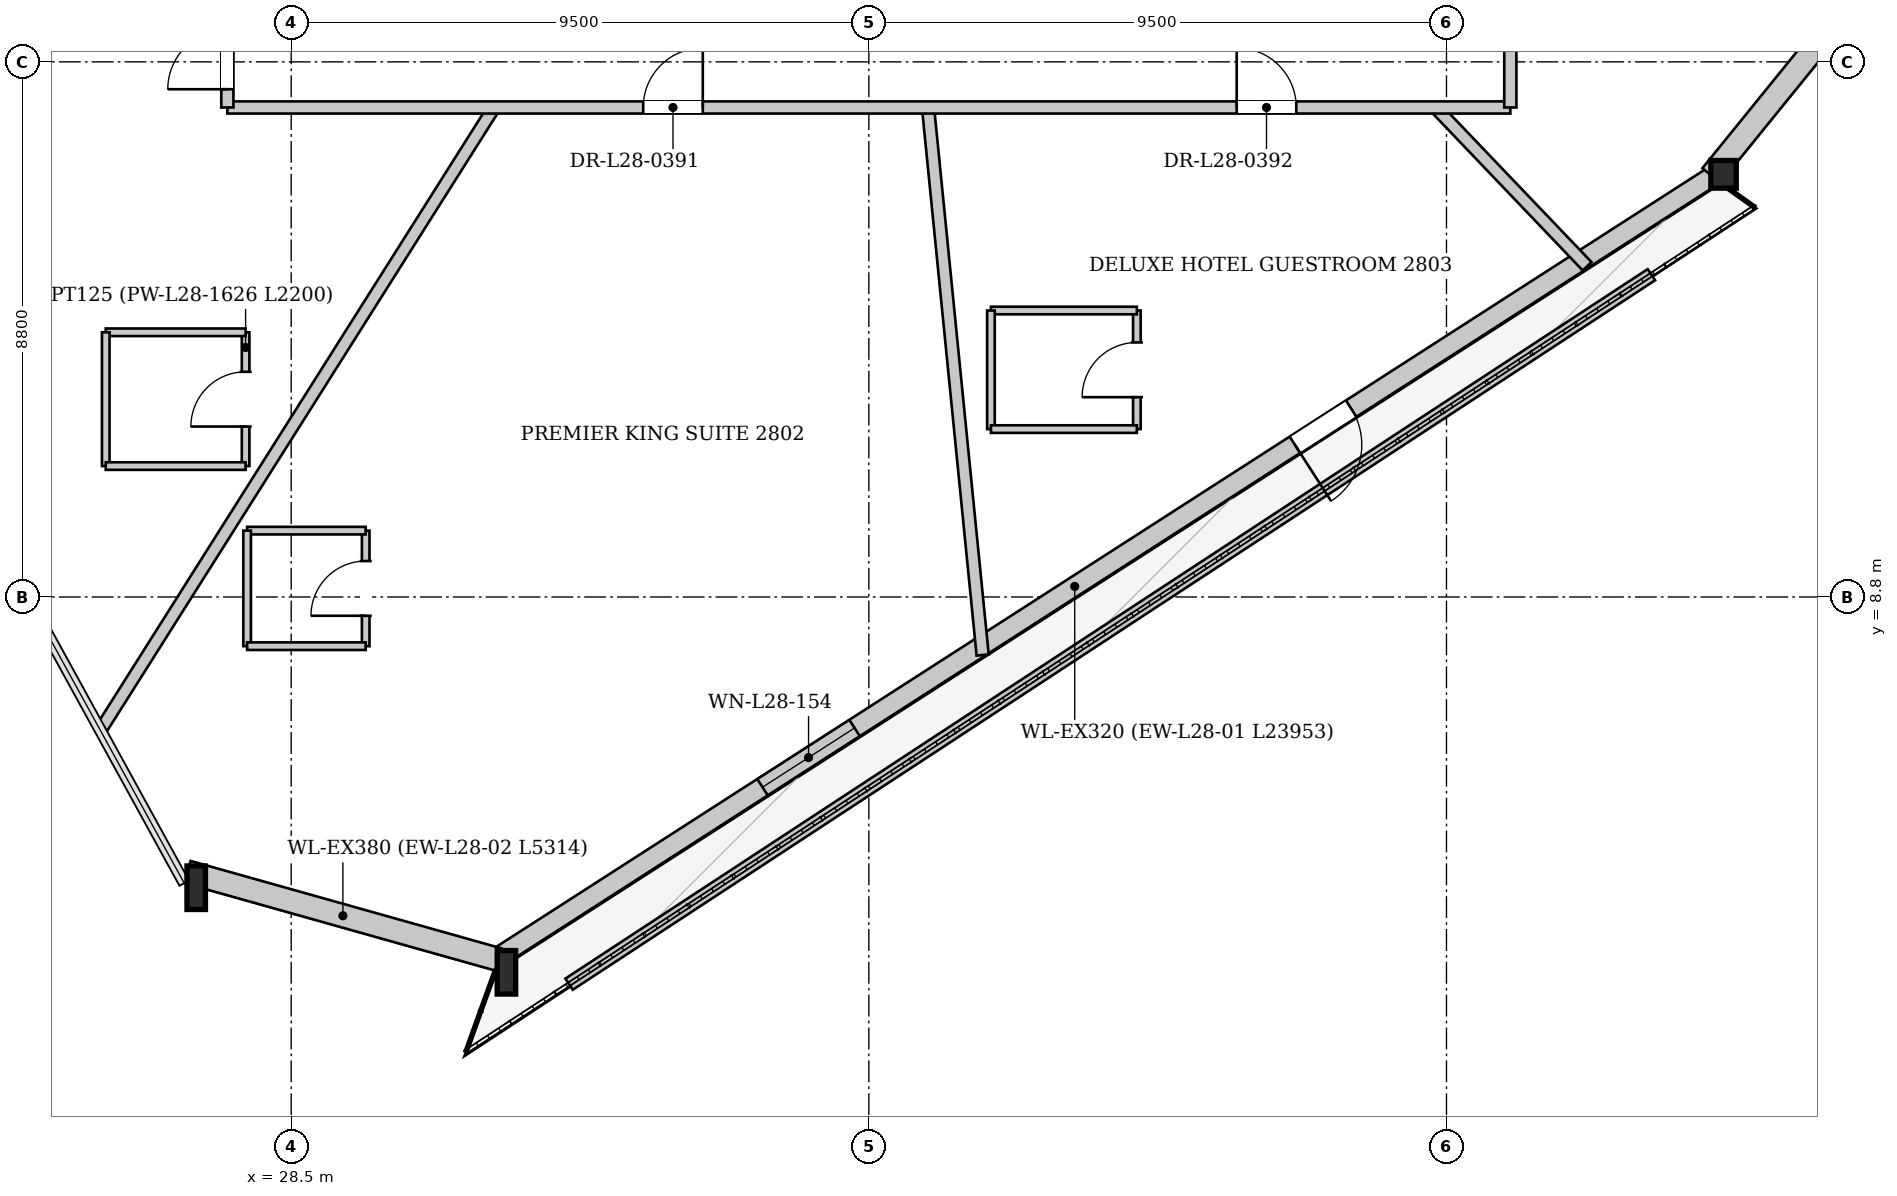
"""IFC4 building model, lengths in metres.
Left out: names, types, materials, properties, quantities, classifications, styles, units other than length and angle.
Written with IfcOpenShell. Run it as: python <this file> out.ifc"""

import sys

from ifc_helpers import new_model, si_unit, direction, frame, frame_2d, origin, origin_2d, place, context, subcontext, project, spatial, rectangle, i_section, extrude, source, transform, mapped, element, fill, save


model = new_model("IFC4")
c1 = context("Model", 3, precision=1e-05, world=origin(), true_north=direction((0.0, 1.0)))
c2 = subcontext(c1, "Body", "Model", "MODEL_VIEW")
j1 = project(units=[si_unit("LENGTHUNIT", "METRE"), si_unit("PLANEANGLEUNIT", "RADIAN")], contexts=[c1])
p1 = place(None, origin())
s1 = spatial("IfcSite", under=j1, at=p1, CompositionType="ELEMENT")
p2 = place(p1, origin())
s2 = spatial("IfcBuilding", under=s1, at=p2, CompositionType="ELEMENT")
p3 = place(p2, frame((0.0, 0.0, 109.25)))
s3 = spatial("IfcBuildingStorey", under=s2, at=p3, CompositionType="ELEMENT", Elevation=109.25)
m1 = source(origin(), c2, "Body", "SweptSolid", [
    extrude(i_section(OverallWidth=0.304, OverallDepth=0.716, WebThickness=0.021, FlangeThickness=0.04, at=origin_2d()), origin(), (0.0, 0.0, 1.0), 3.411),
])
p4 = place(p3, frame((26.741, 4.094, 0.0), z_axis=(0.11523361604, -0.043874662505, 0.992368997765), x_axis=(0.355826354111, 0.934552088286, 0.0)))
e1 = element("IfcColumn", 1, at=p4, inside=s3, PredefinedType="COLUMN", context=c2, shape_type="MappedRepresentation", body=[
    mapped(m1, transform((0.0, 0.0, 0.0), x_axis=(1.0, 0.0, 0.0), y_axis=(0.0, 1.0, 0.0), z_axis=(0.0, 0.0, 1.0), scale=1.0)),
])
m2 = source(origin(), c2, "Body", "SweptSolid", [
    extrude(i_section(OverallWidth=0.304, OverallDepth=0.716, WebThickness=0.021, FlangeThickness=0.04, at=origin_2d()), origin(), (0.0, 0.0, 1.0), 3.405),
])
p5 = place(p3, frame((31.857, 2.656, 0.0), z_axis=(0.107401978094, -0.016561987276, 0.994077721146), x_axis=(0.152404215483, 0.988318245862, 0.0)))
e2 = element("IfcColumn", 2, at=p5, inside=s3, PredefinedType="COLUMN", context=c2, shape_type="MappedRepresentation", body=[
    mapped(m2, transform((0.0, 0.0, 0.0), x_axis=(1.0, 0.0, 0.0), y_axis=(0.0, 1.0, 0.0), z_axis=(0.0, 0.0, 1.0), scale=1.0)),
])
m3 = source(origin(), c2, "Body", "SweptSolid", [
    extrude(i_section(OverallWidth=0.418, OverallDepth=0.455, WebThickness=0.038, FlangeThickness=0.059, at=origin_2d()), origin(), (0.0, 0.0, 1.0), 3.398),
])
p6 = place(p3, frame((52.003, 15.611, 0.0), z_axis=(0.031540088842, 0.081975492868, 0.996135152158), x_axis=(-0.933303436378, 0.359088701639, 0.0)))
e3 = element("IfcColumn", 3, at=p6, inside=s3, PredefinedType="COLUMN", context=c2, shape_type="MappedRepresentation", body=[
    mapped(m3, transform((0.0, 0.0, 0.0), x_axis=(1.0, 0.0, 0.0), y_axis=(0.0, 1.0, 0.0), z_axis=(0.0, 0.0, 1.0), scale=1.0)),
])
p7 = place(p3, frame((51.917, 15.746, 0.0), z_axis=(0.0, 0.0, 1.0), x_axis=(-0.841105279502, -0.540871434626, 0.0)))
e4 = element("IfcWall", 4, at=p7, inside=s3, PredefinedType="SOLIDWALL", context=c2, shape_type="SweptSolid", body=[
    extrude(rectangle(XDim=23.953, YDim=0.32, at=frame_2d((11.976, 0.0))), origin(), (0.0, 0.0, 1.0), 2.692),
])
p8 = place(p7, frame((7.115, 0.0, 0.0)))
e5 = element("IfcOpeningElement", 5, at=p8, cuts=e4, PredefinedType="OPENING", context=c2, shape_type="SweptSolid", body=[
    extrude(rectangle(XDim=1.1, YDim=2.3, at=frame_2d((0.55, 1.15))), frame((0.0, 0.17, 0.0), z_axis=(0.0, -1.0, 0.0), x_axis=(1.0, 0.0, 0.0)), (0.0, 0.0, 1.0), 0.34),
])
p9 = place(p7, frame((16.825, 0.0, 0.372)))
e6 = element("IfcOpeningElement", 6, at=p9, cuts=e4, PredefinedType="OPENING", context=c2, shape_type="SweptSolid", body=[
    extrude(rectangle(XDim=1.8, YDim=2.2, at=frame_2d((0.9, 1.1))), frame((0.0, 0.17, 0.0), z_axis=(0.0, -1.0, 0.0), x_axis=(1.0, 0.0, 0.0)), (0.0, 0.0, 1.0), 0.34),
])
p10 = place(p3, frame((31.908, 2.839, 0.0), z_axis=(0.0, 0.0, 1.0), x_axis=(-0.962702562439, 0.270561963835, 0.0)))
e7 = element("IfcWall", 7, at=p10, inside=s3, PredefinedType="SOLIDWALL", context=c2, shape_type="SweptSolid", body=[
    extrude(rectangle(XDim=5.314, YDim=0.38, at=frame_2d((2.657, 0.0))), origin(), (0.0, 0.0, 1.0), 2.692),
])
p11 = place(p3, frame((66.944, 34.334, 0.0), z_axis=(0.0, 0.0, 1.0), x_axis=(-0.629923947576, -0.776656822715, 0.0)))
e8 = element("IfcWall", 8, at=p11, inside=s3, PredefinedType="SOLIDWALL", context=c2, shape_type="SweptSolid", body=[
    extrude(rectangle(XDim=23.953, YDim=0.38, at=frame_2d((11.976, 0.0))), origin(), (0.0, 0.0, 1.0), 2.692),
])
p12 = place(p11, frame((5.607, 0.0, 0.322)))
e9 = element("IfcOpeningElement", 9, at=p12, cuts=e8, PredefinedType="OPENING", context=c2, shape_type="SweptSolid", body=[
    extrude(rectangle(XDim=2.2, YDim=2.25, at=frame_2d((1.1, 1.125))), frame((0.0, 0.2, 0.0), z_axis=(0.0, -1.0, 0.0), x_axis=(1.0, 0.0, 0.0)), (0.0, 0.0, 1.0), 0.4),
])
p13 = place(p11, frame((16.146, 0.0, 0.322)))
e10 = element("IfcOpeningElement", 10, at=p13, cuts=e8, PredefinedType="OPENING", context=c2, shape_type="SweptSolid", body=[
    extrude(rectangle(XDim=2.2, YDim=2.25, at=frame_2d((1.1, 1.125))), frame((0.0, 0.2, 0.0), z_axis=(0.0, -1.0, 0.0), x_axis=(1.0, 0.0, 0.0)), (0.0, 0.0, 1.0), 0.4),
])
p14 = place(p3, frame((33.07, 2.433, 0.0), z_axis=(0.0, 0.0, 1.0), x_axis=(0.836347057306, 0.548200328106, 0.0)))
e11 = element("IfcWall", 11, at=p14, inside=s3, PredefinedType="PARAPET", context=c2, shape_type="SweptSolid", body=[
    extrude(rectangle(XDim=21.283, YDim=0.22, at=frame_2d((10.641, 0.0))), origin(), (0.0, 0.0, 1.0), 0.3),
])
p15 = place(p3, frame((31.836, 16.85, 0.0), z_axis=(0.0, 0.0, 1.0), x_axis=(-0.534334254855, -0.845273271841, 0.0)))
e12 = element("IfcWall", 12, at=p15, inside=s3, PredefinedType="PARTITIONING", context=c2, shape_type="SweptSolid", body=[
    extrude(rectangle(XDim=12.084, YDim=0.2, at=frame_2d((6.042, 0.0))), origin(), (0.0, 0.0, 1.0), 3.3),
])
p16 = place(p3, frame((38.973, 16.85, 0.0), z_axis=(0.0, 0.0, 1.0), x_axis=(0.099311388346, -0.995056404504, 0.0)))
e13 = element("IfcWall", 13, at=p16, inside=s3, PredefinedType="PARTITIONING", context=c2, shape_type="SweptSolid", body=[
    extrude(rectangle(XDim=9.049, YDim=0.2, at=frame_2d((4.524, 0.0))), origin(), (0.0, 0.0, 1.0), 3.3),
])
p17 = place(p3, frame((47.317, 16.85, 0.0), z_axis=(0.0, 0.0, 1.0), x_axis=(0.690838930263, -0.723008694576, 0.0)))
e14 = element("IfcWall", 14, at=p17, inside=s3, PredefinedType="PARTITIONING", context=c2, shape_type="SweptSolid", body=[
    extrude(rectangle(XDim=3.613, YDim=0.2, at=frame_2d((1.806, 0.0))), origin(), (0.0, 0.0, 1.0), 3.3),
])
p18 = place(p3, frame((27.75, 10.953, 0.0), z_axis=(0.0, 0.0, 1.0), x_axis=(0.0, 1.0, 0.0)))
e15 = element("IfcWall", 15, at=p18, inside=s3, PredefinedType="PARTITIONING", context=c2, shape_type="SweptSolid", body=[
    extrude(rectangle(XDim=2.2, YDim=0.125, at=frame_2d((1.1, 0.0))), origin(), (0.0, 0.0, 1.0), 3.3),
])
p19 = place(p18, frame((0.65, 0.0, 0.0)))
e16 = element("IfcOpeningElement", 16, at=p19, cuts=e15, PredefinedType="OPENING", context=c2, shape_type="SweptSolid", body=[
    extrude(rectangle(XDim=0.9, YDim=2.1, at=frame_2d((0.45, 1.05))), frame((0.0, 0.073, 0.0), z_axis=(0.0, -1.0, 0.0), x_axis=(1.0, 0.0, 0.0)), (0.0, 0.0, 1.0), 0.145),
])
p20 = place(p3, frame((27.75, 13.153, 0.0), z_axis=(0.0, 0.0, 1.0), x_axis=(-1.0, 0.0, 0.0)))
e17 = element("IfcWall", 17, at=p20, inside=s3, PredefinedType="PARTITIONING", context=c2, shape_type="SweptSolid", body=[
    extrude(rectangle(XDim=2.3, YDim=0.125, at=frame_2d((1.15, 0.0))), origin(), (0.0, 0.0, 1.0), 3.3),
])
p21 = place(p3, frame((25.45, 13.153, 0.0), z_axis=(0.0, 0.0, 1.0), x_axis=(0.0, -1.0, 0.0)))
e18 = element("IfcWall", 18, at=p21, inside=s3, PredefinedType="PARTITIONING", context=c2, shape_type="SweptSolid", body=[
    extrude(rectangle(XDim=2.2, YDim=0.125, at=frame_2d((1.1, 0.0))), origin(), (0.0, 0.0, 1.0), 3.3),
])
p22 = place(p3, frame((25.45, 10.953, 0.0), z_axis=(0.0, 0.0, 1.0), x_axis=(1.0, 0.0, 0.0)))
e19 = element("IfcWall", 19, at=p22, inside=s3, PredefinedType="PARTITIONING", context=c2, shape_type="SweptSolid", body=[
    extrude(rectangle(XDim=2.3, YDim=0.125, at=frame_2d((1.15, 0.0))), origin(), (0.0, 0.0, 1.0), 3.3),
])
p23 = place(p3, frame((29.725, 7.991, 0.0), z_axis=(0.0, 0.0, 1.0), x_axis=(0.0, 1.0, 0.0)))
e20 = element("IfcWall", 20, at=p23, inside=s3, PredefinedType="PARTITIONING", context=c2, shape_type="SweptSolid", body=[
    extrude(rectangle(XDim=1.9, YDim=0.125, at=frame_2d((0.95, 0.0))), origin(), (0.0, 0.0, 1.0), 2.795),
])
p24 = place(p23, frame((0.5, 0.0, 0.0)))
e21 = element("IfcOpeningElement", 21, at=p24, cuts=e20, PredefinedType="OPENING", context=c2, shape_type="SweptSolid", body=[
    extrude(rectangle(XDim=0.9, YDim=2.1, at=frame_2d((0.45, 1.05))), frame((0.0, 0.073, 0.0), z_axis=(0.0, -1.0, 0.0), x_axis=(1.0, 0.0, 0.0)), (0.0, 0.0, 1.0), 0.145),
])
p25 = place(p3, frame((29.725, 9.891, 0.0), z_axis=(0.0, 0.0, 1.0), x_axis=(-1.0, 0.0, 0.0)))
e22 = element("IfcWall", 22, at=p25, inside=s3, PredefinedType="PARTITIONING", context=c2, shape_type="SweptSolid", body=[
    extrude(rectangle(XDim=1.95, YDim=0.125, at=frame_2d((0.975, 0.0))), origin(), (0.0, 0.0, 1.0), 3.3),
])
p26 = place(p3, frame((27.775, 9.891, 0.0), z_axis=(0.0, 0.0, 1.0), x_axis=(0.0, -1.0, 0.0)))
e23 = element("IfcWall", 23, at=p26, inside=s3, PredefinedType="PARTITIONING", context=c2, shape_type="SweptSolid", body=[
    extrude(rectangle(XDim=1.9, YDim=0.125, at=frame_2d((0.95, 0.0))), origin(), (0.0, 0.0, 1.0), 3.3),
])
p27 = place(p3, frame((27.775, 7.991, 0.0), z_axis=(0.0, 0.0, 1.0), x_axis=(1.0, 0.0, 0.0)))
e24 = element("IfcWall", 24, at=p27, inside=s3, PredefinedType="PARTITIONING", context=c2, shape_type="SweptSolid", body=[
    extrude(rectangle(XDim=1.95, YDim=0.125, at=frame_2d((0.975, 0.0))), origin(), (0.0, 0.0, 1.0), 3.3),
])
p28 = place(p3, frame((42.408, 11.561, 0.0), z_axis=(0.0, 0.0, 1.0), x_axis=(0.0, 1.0, 0.0)))
e25 = element("IfcWall", 25, at=p28, inside=s3, PredefinedType="PARTITIONING", context=c2, shape_type="SweptSolid", body=[
    extrude(rectangle(XDim=1.95, YDim=0.125, at=frame_2d((0.975, 0.0))), origin(), (0.0, 0.0, 1.0), 3.3),
])
p29 = place(p28, frame((0.525, 0.0, 0.0)))
e26 = element("IfcOpeningElement", 26, at=p29, cuts=e25, PredefinedType="OPENING", context=c2, shape_type="SweptSolid", body=[
    extrude(rectangle(XDim=0.9, YDim=2.1, at=frame_2d((0.45, 1.05))), frame((0.0, 0.073, 0.0), z_axis=(0.0, -1.0, 0.0), x_axis=(1.0, 0.0, 0.0)), (0.0, 0.0, 1.0), 0.145),
])
p30 = place(p3, frame((42.408, 13.511, 0.0), z_axis=(0.0, 0.0, 1.0), x_axis=(-1.0, 0.0, 0.0)))
e27 = element("IfcWall", 27, at=p30, inside=s3, PredefinedType="PARTITIONING", context=c2, shape_type="SweptSolid", body=[
    extrude(rectangle(XDim=2.4, YDim=0.125, at=frame_2d((1.2, 0.0))), origin(), (0.0, 0.0, 1.0), 2.925),
])
p31 = place(p3, frame((40.008, 13.511, 0.0), z_axis=(0.0, 0.0, 1.0), x_axis=(0.0, -1.0, 0.0)))
e28 = element("IfcWall", 28, at=p31, inside=s3, PredefinedType="PARTITIONING", context=c2, shape_type="SweptSolid", body=[
    extrude(rectangle(XDim=1.95, YDim=0.125, at=frame_2d((0.975, 0.0))), origin(), (0.0, 0.0, 1.0), 3.3),
])
p32 = place(p3, frame((40.008, 11.561, 0.0), z_axis=(0.0, 0.0, 1.0), x_axis=(1.0, 0.0, 0.0)))
e29 = element("IfcWall", 29, at=p32, inside=s3, PredefinedType="PARTITIONING", context=c2, shape_type="SweptSolid", body=[
    extrude(rectangle(XDim=2.4, YDim=0.125, at=frame_2d((1.2, 0.0))), origin(), (0.0, 0.0, 1.0), 3.3),
])
p33 = place(p3, frame((27.45, 16.85, 0.0), z_axis=(0.0, 0.0, 1.0), x_axis=(1.0, 0.0, 0.0)))
e30 = element("IfcWall", 30, at=p33, inside=s3, PredefinedType="PARTITIONING", context=c2, shape_type="SweptSolid", body=[
    extrude(rectangle(XDim=21.1, YDim=0.2, at=frame_2d((10.55, 0.0))), origin(), (0.0, 0.0, 1.0), 2.925),
])
p34 = place(p33, frame((6.839, 0.0, 0.0)))
e31 = element("IfcOpeningElement", 31, at=p34, cuts=e30, PredefinedType="OPENING", context=c2, shape_type="SweptSolid", body=[
    extrude(rectangle(XDim=0.98, YDim=2.15, at=frame_2d((0.49, 1.075))), frame((0.0, 0.11, 0.0), z_axis=(0.0, -1.0, 0.0), x_axis=(1.0, 0.0, 0.0)), (0.0, 0.0, 1.0), 0.22),
])
p35 = place(p33, frame((16.6, 0.0, 0.0)))
e32 = element("IfcOpeningElement", 32, at=p35, cuts=e30, PredefinedType="OPENING", context=c2, shape_type="SweptSolid", body=[
    extrude(rectangle(XDim=0.98, YDim=2.15, at=frame_2d((0.49, 1.075))), frame((0.0, 0.11, 0.0), z_axis=(0.0, -1.0, 0.0), x_axis=(1.0, 0.0, 0.0)), (0.0, 0.0, 1.0), 0.22),
])
p36 = place(p3, frame((27.45, 16.85, 0.0), z_axis=(0.0, 0.0, 1.0), x_axis=(0.0, 1.0, 0.0)))
e33 = element("IfcWall", 33, at=p36, inside=s3, PredefinedType="PARTITIONING", context=c2, shape_type="SweptSolid", body=[
    extrude(rectangle(XDim=19.5, YDim=0.2, at=frame_2d((9.75, 0.0))), origin(), (0.0, 0.0, 1.0), 3.3),
])
p37 = place(p36, frame((0.3, 0.0, 0.0)))
e34 = element("IfcOpeningElement", 34, at=p37, cuts=e33, PredefinedType="OPENING", context=c2, shape_type="SweptSolid", body=[
    extrude(rectangle(XDim=0.98, YDim=2.15, at=frame_2d((0.49, 1.075))), frame((0.0, 0.11, 0.0), z_axis=(0.0, -1.0, 0.0), x_axis=(1.0, 0.0, 0.0)), (0.0, 0.0, 1.0), 0.22),
])
p38 = place(p36, frame((16.768, 0.0, 0.0)))
e35 = element("IfcOpeningElement", 35, at=p38, cuts=e33, PredefinedType="OPENING", context=c2, shape_type="SweptSolid", body=[
    extrude(rectangle(XDim=0.98, YDim=2.15, at=frame_2d((0.49, 1.075))), frame((0.0, 0.11, 0.0), z_axis=(0.0, -1.0, 0.0), x_axis=(1.0, 0.0, 0.0)), (0.0, 0.0, 1.0), 0.22),
])
p39 = place(p36, frame((9.362, 0.0, 0.0)))
e36 = element("IfcOpeningElement", 36, at=p39, cuts=e33, PredefinedType="OPENING", context=c2, shape_type="SweptSolid", body=[
    extrude(rectangle(XDim=0.98, YDim=2.15, at=frame_2d((0.49, 1.075))), frame((0.0, 0.11, 0.0), z_axis=(0.0, -1.0, 0.0), x_axis=(1.0, 0.0, 0.0)), (0.0, 0.0, 1.0), 0.22),
])
p40 = place(p3, frame((48.55, 16.85, 0.0), z_axis=(0.0, 0.0, 1.0), x_axis=(0.0, 1.0, 0.0)))
e37 = element("IfcWall", 37, at=p40, inside=s3, PredefinedType="PARTITIONING", context=c2, shape_type="SweptSolid", body=[
    extrude(rectangle(XDim=19.5, YDim=0.2, at=frame_2d((9.75, 0.0))), origin(), (0.0, 0.0, 1.0), 3.3),
])
p41 = place(p40, frame((1.963, 0.0, 0.0)))
e38 = element("IfcOpeningElement", 38, at=p41, cuts=e37, PredefinedType="OPENING", context=c2, shape_type="SweptSolid", body=[
    extrude(rectangle(XDim=0.98, YDim=2.15, at=frame_2d((0.49, 1.075))), frame((0.0, 0.11, 0.0), z_axis=(0.0, -1.0, 0.0), x_axis=(1.0, 0.0, 0.0)), (0.0, 0.0, 1.0), 0.22),
])
p42 = place(p40, frame((11.52, 0.0, 0.0)))
e39 = element("IfcOpeningElement", 39, at=p42, cuts=e37, PredefinedType="OPENING", context=c2, shape_type="SweptSolid", body=[
    extrude(rectangle(XDim=0.98, YDim=2.15, at=frame_2d((0.49, 1.075))), frame((0.0, 0.11, 0.0), z_axis=(0.0, -1.0, 0.0), x_axis=(1.0, 0.0, 0.0)), (0.0, 0.0, 1.0), 0.22),
])
m4 = source(origin(), c2, "Body", "SweptSolid", [
    extrude(rectangle(XDim=1.1, YDim=2.3, at=frame_2d((0.55, 1.15))), frame((0.0, 0.025, 0.0), z_axis=(0.0, -1.0, 0.0), x_axis=(1.0, 0.0, 0.0)), (0.0, 0.0, 1.0), 0.05),
])
p43 = place(p8, origin())
e40 = element("IfcDoor", 40, at=p43, inside=s3, OperationType="SINGLE_SWING_RIGHT", PredefinedType="DOOR", context=c2, shape_type="MappedRepresentation", body=[
    mapped(m4, transform((0.0, 0.0, 0.0), x_axis=(1.0, 0.0, 0.0), y_axis=(0.0, 1.0, 0.0), z_axis=(0.0, 0.0, 1.0), scale=1.0)),
])
fill(e5, e40)
m5 = source(origin(), c2, "Body", "SweptSolid", [
    extrude(rectangle(XDim=1.8, YDim=2.2, at=frame_2d((0.9, 1.1))), frame((0.0, 0.03, 0.0), z_axis=(0.0, -1.0, 0.0), x_axis=(1.0, 0.0, 0.0)), (0.0, 0.0, 1.0), 0.06),
])
p44 = place(p9, origin())
e41 = element("IfcWindow", 41, at=p44, inside=s3, PartitioningType="SINGLE_PANEL", PredefinedType="WINDOW", context=c2, shape_type="MappedRepresentation", body=[
    mapped(m5, transform((0.0, 0.0, 0.0), x_axis=(1.0, 0.0, 0.0), y_axis=(0.0, 1.0, 0.0), z_axis=(0.0, 0.0, 1.0), scale=1.0)),
])
fill(e6, e41)
m6 = source(origin(), c2, "Body", "SweptSolid", [
    extrude(rectangle(XDim=0.9, YDim=2.1, at=frame_2d((0.45, 1.05))), frame((0.0, 0.025, 0.0), z_axis=(0.0, -1.0, 0.0), x_axis=(1.0, 0.0, 0.0)), (0.0, 0.0, 1.0), 0.05),
])
p45 = place(p19, origin())
e42 = element("IfcDoor", 42, at=p45, inside=s3, OperationType="SINGLE_SWING_LEFT", PredefinedType="DOOR", context=c2, shape_type="MappedRepresentation", body=[
    mapped(m6, transform((0.0, 0.0, 0.0), x_axis=(1.0, 0.0, 0.0), y_axis=(0.0, 1.0, 0.0), z_axis=(0.0, 0.0, 1.0), scale=1.0)),
])
fill(e16, e42)
p46 = place(p24, origin())
e43 = element("IfcDoor", 43, at=p46, inside=s3, OperationType="SINGLE_SWING_LEFT", PredefinedType="DOOR", context=c2, shape_type="MappedRepresentation", body=[
    mapped(m6, transform((0.0, 0.0, 0.0), x_axis=(1.0, 0.0, 0.0), y_axis=(0.0, 1.0, 0.0), z_axis=(0.0, 0.0, 1.0), scale=1.0)),
])
fill(e21, e43)
p47 = place(p29, origin())
e44 = element("IfcDoor", 44, at=p47, inside=s3, OperationType="SINGLE_SWING_LEFT", PredefinedType="DOOR", context=c2, shape_type="MappedRepresentation", body=[
    mapped(m6, transform((0.0, 0.0, 0.0), x_axis=(1.0, 0.0, 0.0), y_axis=(0.0, 1.0, 0.0), z_axis=(0.0, 0.0, 1.0), scale=1.0)),
])
fill(e26, e44)
m7 = source(origin(), c2, "Body", "SweptSolid", [
    extrude(rectangle(XDim=0.98, YDim=2.15, at=frame_2d((0.49, 1.075))), frame((0.0, 0.025, 0.0), z_axis=(0.0, -1.0, 0.0), x_axis=(1.0, 0.0, 0.0)), (0.0, 0.0, 1.0), 0.05),
])
p48 = place(p34, origin())
e45 = element("IfcDoor", 45, at=p48, inside=s3, OperationType="SINGLE_SWING_RIGHT", PredefinedType="DOOR", context=c2, shape_type="MappedRepresentation", body=[
    mapped(m7, transform((0.0, 0.0, 0.0), x_axis=(1.0, 0.0, 0.0), y_axis=(0.0, 1.0, 0.0), z_axis=(0.0, 0.0, 1.0), scale=1.0)),
])
fill(e31, e45)
p49 = place(p35, origin())
e46 = element("IfcDoor", 46, at=p49, inside=s3, OperationType="SINGLE_SWING_LEFT", PredefinedType="DOOR", context=c2, shape_type="MappedRepresentation", body=[
    mapped(m7, transform((0.0, 0.0, 0.0), x_axis=(1.0, 0.0, 0.0), y_axis=(0.0, 1.0, 0.0), z_axis=(0.0, 0.0, 1.0), scale=1.0)),
])
fill(e32, e46)
p50 = place(p37, origin())
e47 = element("IfcDoor", 47, at=p50, inside=s3, OperationType="SINGLE_SWING_LEFT", PredefinedType="DOOR", context=c2, shape_type="MappedRepresentation", body=[
    mapped(m7, transform((0.0, 0.0, 0.0), x_axis=(1.0, 0.0, 0.0), y_axis=(0.0, 1.0, 0.0), z_axis=(0.0, 0.0, 1.0), scale=1.0)),
])
fill(e34, e47)
save(model, sys.argv[1])
